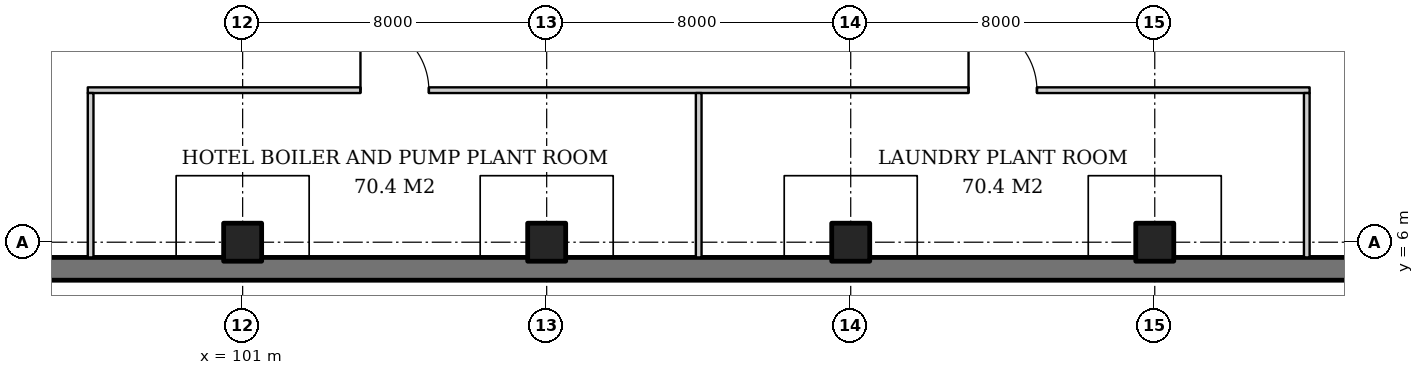
"""IFC4 building model, lengths in metres.
Left out: names, types, materials, properties, quantities, classifications, styles, units other than length and angle.
Written with IfcOpenShell. Run it as: python <this file> out.ifc"""

import sys

from ifc_helpers import new_model, si_unit, direction, frame, frame_2d, origin, origin_2d, place, context, subcontext, project, spatial, rectangle, extrude, element, fill, save


model = new_model("IFC4")
c1 = context("Model", 3, precision=1e-05, world=origin(), true_north=direction((0.0, 1.0)))
c2 = subcontext(c1, "Body", "Model", "MODEL_VIEW")
j1 = project(units=[si_unit("LENGTHUNIT", "METRE"), si_unit("PLANEANGLEUNIT", "RADIAN")], contexts=[c1])
p1 = place(None, origin())
s1 = spatial("IfcSite", under=j1, at=p1, CompositionType="ELEMENT")
p2 = place(p1, origin())
s2 = spatial("IfcBuilding", under=s1, at=p2, CompositionType="ELEMENT")
p3 = place(p2, frame((0.0, 0.0, -10.0)))
s3 = spatial("IfcBuildingStorey", under=s2, at=p3, CompositionType="ELEMENT", Elevation=-10.0)
for number, where, z_axis, x_axis in (
    (1, (101.0, 6.0, 0.0), (0.0, 0.0, 1.0), (1.0, 0.0, 0.0)),
    (2, (109.0, 6.0, 0.0), (0.0, 0.0, 1.0), (1.0, 0.0, 0.0)),
    (3, (117.0, 6.0, 0.0), (0.0, 0.0, 1.0), (1.0, 0.0, 0.0)),
    (4, (125.0, 6.0, 0.0), (0.0, 0.0, 1.0), (1.0, 0.0, 0.0)),
):
    element("IfcColumn", number, at=place(p3, frame(where, z_axis=z_axis, x_axis=x_axis)), inside=s3, PredefinedType="COLUMN", context=c2, shape_type="SweptSolid", body=[
        extrude(rectangle(XDim=1.0, YDim=1.0, at=origin_2d()), origin(), (0.0, 0.0, 1.0), 5.0),
    ])
p4 = place(p3, frame((85.025, 5.3, -0.5), z_axis=(0.0, 0.0, 1.0), x_axis=(1.0, 0.0, 0.0)))
e5 = element("IfcWall", 5, at=p4, inside=s3, PredefinedType="USERDEFINED", context=c2, shape_type="SweptSolid", body=[
    extrude(rectangle(XDim=56.975, YDim=0.6, at=frame_2d((28.488, 0.0))), origin(), (0.0, 0.0, 1.0), 5.5),
])
p5 = place(p3, frame((96.925, 10.0, 0.0), z_axis=(0.0, 0.0, 1.0), x_axis=(1.0, 0.0, 0.0)))
e6 = element("IfcWall", 6, at=p5, inside=s3, PredefinedType="PARTITIONING", context=c2, shape_type="SweptSolid", body=[
    extrude(rectangle(XDim=32.15, YDim=0.15, at=frame_2d((16.075, 0.0))), origin(), (0.0, 0.0, 1.0), 4.7),
])
p6 = place(p5, frame((7.175, 0.0, 0.0)))
e7 = element("IfcOpeningElement", 7, at=p6, cuts=e6, PredefinedType="OPENING", context=c2, shape_type="SweptSolid", body=[
    extrude(rectangle(XDim=1.8, YDim=2.4, at=frame_2d((0.9, 1.2))), frame((0.0, 0.085, 0.0), z_axis=(0.0, -1.0, 0.0), x_axis=(1.0, 0.0, 0.0)), (0.0, 0.0, 1.0), 0.17),
])
p7 = place(p5, frame((23.175, 0.0, 0.0)))
e8 = element("IfcOpeningElement", 8, at=p7, cuts=e6, PredefinedType="OPENING", context=c2, shape_type="SweptSolid", body=[
    extrude(rectangle(XDim=1.8, YDim=2.4, at=frame_2d((0.9, 1.2))), frame((0.0, 0.085, 0.0), z_axis=(0.0, -1.0, 0.0), x_axis=(1.0, 0.0, 0.0)), (0.0, 0.0, 1.0), 0.17),
])
for number, where, z_axis, x_axis in (
    (9, (97.0, 9.925, 0.0), (0.0, 0.0, 1.0), (0.0, -1.0, 0.0)),
    (10, (113.0, 9.925, 0.0), (0.0, 0.0, 1.0), (0.0, -1.0, 0.0)),
    (11, (129.0, 9.925, 0.0), (0.0, 0.0, 1.0), (0.0, -1.0, 0.0)),
):
    element("IfcWall", number, at=place(p3, frame(where, z_axis=z_axis, x_axis=x_axis)), inside=s3, PredefinedType="PARTITIONING", context=c2, shape_type="SweptSolid", body=[
        extrude(rectangle(XDim=4.325, YDim=0.15, at=frame_2d((2.163, 0.0))), origin(), (0.0, 0.0, 1.0), 4.7),
    ])
p8 = place(p6, origin())
e12 = element("IfcDoor", 12, at=p8, inside=s3, OperationType="DOUBLE_DOOR_SINGLE_SWING", PredefinedType="DOOR", context=c2, shape_type="SweptSolid", body=[
    extrude(rectangle(XDim=1.8, YDim=2.4, at=frame_2d((0.9, 1.2))), frame((0.0, 0.025, 0.0), z_axis=(0.0, -1.0, 0.0), x_axis=(1.0, 0.0, 0.0)), (0.0, 0.0, 1.0), 0.05),
])
fill(e7, e12)
p9 = place(p7, origin())
e13 = element("IfcDoor", 13, at=p9, inside=s3, OperationType="DOUBLE_DOOR_SINGLE_SWING", PredefinedType="DOOR", context=c2, shape_type="SweptSolid", body=[
    extrude(rectangle(XDim=1.8, YDim=2.4, at=frame_2d((0.9, 1.2))), frame((0.0, 0.025, 0.0), z_axis=(0.0, -1.0, 0.0), x_axis=(1.0, 0.0, 0.0)), (0.0, 0.0, 1.0), 0.05),
])
fill(e8, e13)
save(model, sys.argv[1])
